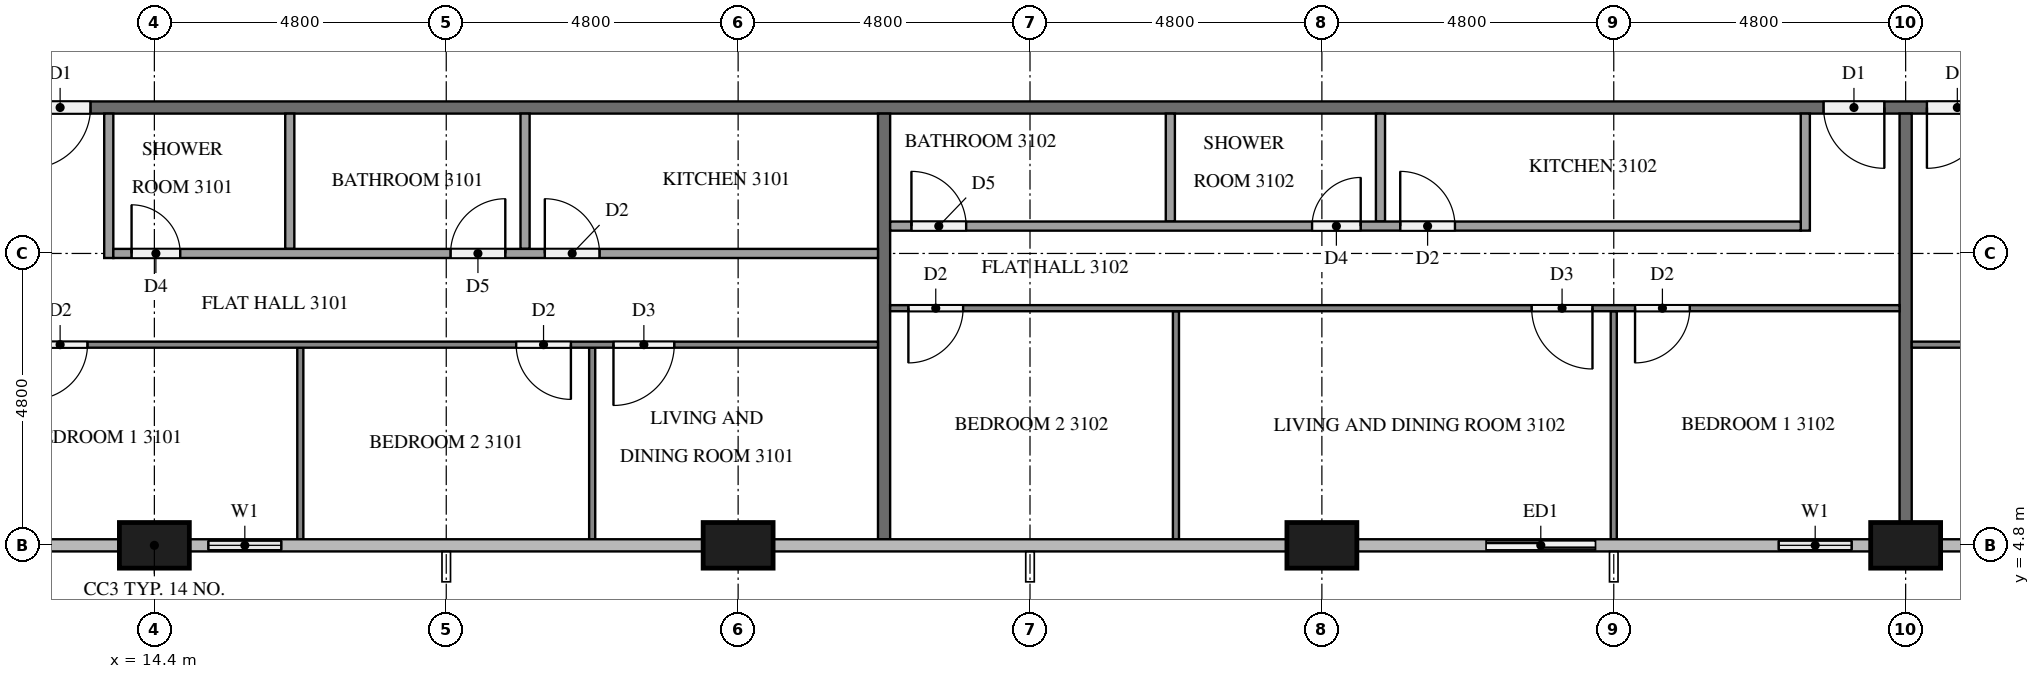
"""IFC4 building model, lengths in metres.
Left out: names, types, materials, properties, quantities, classifications, styles, units other than length and angle.
Written with IfcOpenShell. Run it as: python <this file> out.ifc"""

import sys

from ifc_helpers import new_model, si_unit, direction, frame, frame_2d, origin, origin_2d, place, context, subcontext, project, spatial, rectangle, extrude, element, fill, save


model = new_model("IFC4")
c1 = context("Model", 3, precision=1e-05, world=origin(), true_north=direction((0.0, 1.0)))
c2 = subcontext(c1, "Body", "Model", "MODEL_VIEW")
j1 = project(units=[si_unit("LENGTHUNIT", "METRE"), si_unit("PLANEANGLEUNIT", "RADIAN")], contexts=[c1])
p1 = place(None, origin())
s1 = spatial("IfcSite", under=j1, at=p1, CompositionType="ELEMENT")
p2 = place(p1, origin())
s2 = spatial("IfcBuilding", under=s1, at=p2, CompositionType="ELEMENT")
p3 = place(p2, frame((0.0, 0.0, 122.6)))
s3 = spatial("IfcBuildingStorey", under=s2, at=p3, CompositionType="ELEMENT", Elevation=122.6)
for number, where, z_axis, x_axis in (
    (1, (14.4, 4.8, 0.0), (0.0, 0.0, 1.0), (1.0, 0.0, 0.0)),
    (2, (24.0, 4.8, 0.0), (0.0, 0.0, 1.0), (1.0, 0.0, 0.0)),
    (3, (33.6, 4.8, 0.0), (0.0, 0.0, 1.0), (1.0, 0.0, 0.0)),
    (4, (43.2, 4.8, 0.0), (0.0, 0.0, 1.0), (1.0, 0.0, 0.0)),
):
    element("IfcColumn", number, at=place(p3, frame(where, z_axis=z_axis, x_axis=x_axis)), inside=s3, PredefinedType="COLUMN", context=c2, shape_type="SweptSolid", body=[
        extrude(rectangle(XDim=1.15, YDim=0.75, at=origin_2d()), origin(), (0.0, 0.0, 1.0), 3.2),
    ])
p4 = place(p3, frame((14.975, 4.8, 0.0), z_axis=(0.0, 0.0, 1.0), x_axis=(1.0, 0.0, 0.0)))
e5 = element("IfcWall", 5, at=p4, inside=s3, PredefinedType="SOLIDWALL", context=c2, shape_type="SweptSolid", body=[
    extrude(rectangle(XDim=1.825, YDim=0.15, at=frame_2d((0.913, 0.0))), origin(), (0.0, 0.0, 1.0), 3.2),
])
p5 = place(p4, frame((0.312, 0.0, 0.9)))
e6 = element("IfcOpeningElement", 6, at=p5, cuts=e5, PredefinedType="OPENING", context=c2, shape_type="SweptSolid", body=[
    extrude(rectangle(XDim=1.2, YDim=1.4, at=frame_2d((0.6, 0.7))), frame((0.0, 0.085, 0.0), z_axis=(0.0, -1.0, 0.0), x_axis=(1.0, 0.0, 0.0)), (0.0, 0.0, 1.0), 0.17),
])
p6 = place(p3, frame((36.0, 4.8, 0.0), z_axis=(0.0, 0.0, 1.0), x_axis=(1.0, 0.0, 0.0)))
e7 = element("IfcWall", 7, at=p6, inside=s3, PredefinedType="SOLIDWALL", context=c2, shape_type="SweptSolid", body=[
    extrude(rectangle(XDim=2.4, YDim=0.15, at=frame_2d((1.2, 0.0))), origin(), (0.0, 0.0, 1.0), 3.2),
])
p7 = place(p6, frame((0.3, 0.0, 0.0)))
e8 = element("IfcOpeningElement", 8, at=p7, cuts=e7, PredefinedType="OPENING", context=c2, shape_type="SweptSolid", body=[
    extrude(rectangle(XDim=1.8, YDim=2.4, at=frame_2d((0.9, 1.2))), frame((0.0, 0.085, 0.0), z_axis=(0.0, -1.0, 0.0), x_axis=(1.0, 0.0, 0.0)), (0.0, 0.0, 1.0), 0.17),
])
p8 = place(p3, frame((40.8, 4.8, 0.0), z_axis=(0.0, 0.0, 1.0), x_axis=(1.0, 0.0, 0.0)))
e9 = element("IfcWall", 9, at=p8, inside=s3, PredefinedType="SOLIDWALL", context=c2, shape_type="SweptSolid", body=[
    extrude(rectangle(XDim=1.825, YDim=0.15, at=frame_2d((0.913, 0.0))), origin(), (0.0, 0.0, 1.0), 3.2),
])
p9 = place(p8, frame((0.312, 0.0, 0.9)))
e10 = element("IfcOpeningElement", 10, at=p9, cuts=e9, PredefinedType="OPENING", context=c2, shape_type="SweptSolid", body=[
    extrude(rectangle(XDim=1.2, YDim=1.4, at=frame_2d((0.6, 0.7))), frame((0.0, 0.085, 0.0), z_axis=(0.0, -1.0, 0.0), x_axis=(1.0, 0.0, 0.0)), (0.0, 0.0, 1.0), 0.17),
])
p10 = place(p3, frame((50.5, 12.0, 0.0), z_axis=(0.0, 0.0, 1.0), x_axis=(-1.0, 0.0, 0.0)))
e11 = element("IfcWall", 11, at=p10, inside=s3, PredefinedType="PARTITIONING", context=c2, shape_type="SweptSolid", body=[
    extrude(rectangle(XDim=38.6, YDim=0.2, at=frame_2d((19.3, 0.0))), origin(), (0.0, 0.0, 1.0), 3.2),
])
p11 = place(p10, frame((37.15, 0.0, 0.0)))
e12 = element("IfcOpeningElement", 12, at=p11, cuts=e11, PredefinedType="OPENING", context=c2, shape_type="SweptSolid", body=[
    extrude(rectangle(XDim=1.0, YDim=2.1, at=frame_2d((0.5, 1.05))), frame((0.0, 0.11, 0.0), z_axis=(0.0, -1.0, 0.0), x_axis=(1.0, 0.0, 0.0)), (0.0, 0.0, 1.0), 0.22),
])
p12 = place(p10, frame((7.65, 0.0, 0.0)))
e13 = element("IfcOpeningElement", 13, at=p12, cuts=e11, PredefinedType="OPENING", context=c2, shape_type="SweptSolid", body=[
    extrude(rectangle(XDim=1.0, YDim=2.1, at=frame_2d((0.5, 1.05))), frame((0.0, 0.11, 0.0), z_axis=(0.0, -1.0, 0.0), x_axis=(1.0, 0.0, 0.0)), (0.0, 0.0, 1.0), 0.22),
])
p13 = place(p10, frame((5.95, 0.0, 0.0)))
e14 = element("IfcOpeningElement", 14, at=p13, cuts=e11, PredefinedType="OPENING", context=c2, shape_type="SweptSolid", body=[
    extrude(rectangle(XDim=1.0, YDim=2.1, at=frame_2d((0.5, 1.05))), frame((0.0, 0.11, 0.0), z_axis=(0.0, -1.0, 0.0), x_axis=(1.0, 0.0, 0.0)), (0.0, 0.0, 1.0), 0.22),
])
p14 = place(p3, frame((26.4, 11.9, 0.0), z_axis=(0.0, 0.0, 1.0), x_axis=(0.0, -1.0, 0.0)))
e15 = element("IfcWall", 15, at=p14, inside=s3, PredefinedType="PARTITIONING", context=c2, shape_type="SweptSolid", body=[
    extrude(rectangle(XDim=7.0, YDim=0.2, at=frame_2d((3.5, 0.0))), origin(), (0.0, 0.0, 1.0), 3.2),
])
p15 = place(p3, frame((43.2, 11.9, 0.0), z_axis=(0.0, 0.0, 1.0), x_axis=(0.0, -1.0, 0.0)))
e16 = element("IfcWall", 16, at=p15, inside=s3, PredefinedType="PARTITIONING", context=c2, shape_type="SweptSolid", body=[
    extrude(rectangle(XDim=6.725, YDim=0.2, at=frame_2d((3.362, 0.0))), origin(), (0.0, 0.0, 1.0), 3.2),
])
for number, where, z_axis, x_axis in (
    (17, (16.8, 8.05, 0.0), (0.0, 0.0, 1.0), (0.0, -1.0, 0.0)),
    (18, (21.6, 8.05, 0.0), (0.0, 0.0, 1.0), (0.0, -1.0, 0.0)),
):
    element("IfcWall", number, at=place(p3, frame(where, z_axis=z_axis, x_axis=x_axis)), inside=s3, PredefinedType="PARTITIONING", context=c2, shape_type="SweptSolid", body=[
        extrude(rectangle(XDim=3.15, YDim=0.1, at=frame_2d((1.575, 0.0))), origin(), (0.0, 0.0, 1.0), 3.2),
    ])
p16 = place(p3, frame((26.3, 8.1, 0.0), z_axis=(0.0, 0.0, 1.0), x_axis=(-1.0, 0.0, 0.0)))
e19 = element("IfcWall", 19, at=p16, inside=s3, PredefinedType="PARTITIONING", context=c2, shape_type="SweptSolid", body=[
    extrude(rectangle(XDim=14.2, YDim=0.1, at=frame_2d((7.1, 0.0))), origin(), (0.0, 0.0, 1.0), 3.2),
])
p17 = place(p16, frame((13.0, 0.0, 0.0)))
e20 = element("IfcOpeningElement", 20, at=p17, cuts=e19, PredefinedType="OPENING", context=c2, shape_type="SweptSolid", body=[
    extrude(rectangle(XDim=0.9, YDim=2.1, at=frame_2d((0.45, 1.05))), frame((0.0, 0.06, 0.0), z_axis=(0.0, -1.0, 0.0), x_axis=(1.0, 0.0, 0.0)), (0.0, 0.0, 1.0), 0.12),
])
p18 = place(p16, frame((5.05, 0.0, 0.0)))
e21 = element("IfcOpeningElement", 21, at=p18, cuts=e19, PredefinedType="OPENING", context=c2, shape_type="SweptSolid", body=[
    extrude(rectangle(XDim=0.9, YDim=2.1, at=frame_2d((0.45, 1.05))), frame((0.0, 0.06, 0.0), z_axis=(0.0, -1.0, 0.0), x_axis=(1.0, 0.0, 0.0)), (0.0, 0.0, 1.0), 0.12),
])
p19 = place(p16, frame((3.35, 0.0, 0.0)))
e22 = element("IfcOpeningElement", 22, at=p19, cuts=e19, PredefinedType="OPENING", context=c2, shape_type="SweptSolid", body=[
    extrude(rectangle(XDim=1.0, YDim=2.1, at=frame_2d((0.5, 1.05))), frame((0.0, 0.06, 0.0), z_axis=(0.0, -1.0, 0.0), x_axis=(1.0, 0.0, 0.0)), (0.0, 0.0, 1.0), 0.12),
])
for number, where, z_axis, x_axis in (
    (23, (16.627, 11.9, 0.0), (0.0, 0.0, 1.0), (0.0, -1.0, 0.0)),
    (24, (20.496, 11.9, 0.0), (0.0, 0.0, 1.0), (0.0, -1.0, 0.0)),
):
    element("IfcWall", number, at=place(p3, frame(where, z_axis=z_axis, x_axis=x_axis)), inside=s3, PredefinedType="PARTITIONING", context=c2, shape_type="SweptSolid", body=[
        extrude(rectangle(XDim=2.225, YDim=0.15, at=frame_2d((1.112, 0.0))), origin(), (0.0, 0.0, 1.0), 3.2),
    ])
p20 = place(p3, frame((13.65, 11.9, 0.0), z_axis=(0.0, 0.0, 1.0), x_axis=(0.0, -1.0, 0.0)))
e25 = element("IfcWall", 25, at=p20, inside=s3, PredefinedType="PARTITIONING", context=c2, shape_type="SweptSolid", body=[
    extrude(rectangle(XDim=2.375, YDim=0.15, at=frame_2d((1.188, 0.0))), origin(), (0.0, 0.0, 1.0), 3.2),
])
p21 = place(p3, frame((13.725, 9.6, 0.0), z_axis=(0.0, 0.0, 1.0), x_axis=(1.0, 0.0, 0.0)))
e26 = element("IfcWall", 26, at=p21, inside=s3, PredefinedType="PARTITIONING", context=c2, shape_type="SweptSolid", body=[
    extrude(rectangle(XDim=12.575, YDim=0.15, at=frame_2d((6.288, 0.0))), origin(), (0.0, 0.0, 1.0), 3.2),
])
p22 = place(p21, frame((0.3, 0.0, 0.0)))
e27 = element("IfcOpeningElement", 27, at=p22, cuts=e26, PredefinedType="OPENING", context=c2, shape_type="SweptSolid", body=[
    extrude(rectangle(XDim=0.8, YDim=2.1, at=frame_2d((0.4, 1.05))), frame((0.0, 0.085, 0.0), z_axis=(0.0, -1.0, 0.0), x_axis=(1.0, 0.0, 0.0)), (0.0, 0.0, 1.0), 0.17),
])
p23 = place(p21, frame((5.546, 0.0, 0.0)))
e28 = element("IfcOpeningElement", 28, at=p23, cuts=e26, PredefinedType="OPENING", context=c2, shape_type="SweptSolid", body=[
    extrude(rectangle(XDim=0.9, YDim=2.1, at=frame_2d((0.45, 1.05))), frame((0.0, 0.085, 0.0), z_axis=(0.0, -1.0, 0.0), x_axis=(1.0, 0.0, 0.0)), (0.0, 0.0, 1.0), 0.17),
])
p24 = place(p21, frame((7.096, 0.0, 0.0)))
e29 = element("IfcOpeningElement", 29, at=p24, cuts=e26, PredefinedType="OPENING", context=c2, shape_type="SweptSolid", body=[
    extrude(rectangle(XDim=0.9, YDim=2.1, at=frame_2d((0.45, 1.05))), frame((0.0, 0.085, 0.0), z_axis=(0.0, -1.0, 0.0), x_axis=(1.0, 0.0, 0.0)), (0.0, 0.0, 1.0), 0.17),
])
for number, where, z_axis, x_axis in (
    (30, (38.4, 8.65, 0.0), (0.0, 0.0, 1.0), (0.0, -1.0, 0.0)),
    (31, (31.2, 8.65, 0.0), (0.0, 0.0, 1.0), (0.0, -1.0, 0.0)),
):
    element("IfcWall", number, at=place(p3, frame(where, z_axis=z_axis, x_axis=x_axis)), inside=s3, PredefinedType="PARTITIONING", context=c2, shape_type="SweptSolid", body=[
        extrude(rectangle(XDim=3.75, YDim=0.1, at=frame_2d((1.875, 0.0))), origin(), (0.0, 0.0, 1.0), 3.2),
    ])
p25 = place(p3, frame((43.1, 8.7, 0.0), z_axis=(0.0, 0.0, 1.0), x_axis=(-1.0, 0.0, 0.0)))
e32 = element("IfcWall", 32, at=p25, inside=s3, PredefinedType="PARTITIONING", context=c2, shape_type="SweptSolid", body=[
    extrude(rectangle(XDim=16.6, YDim=0.1, at=frame_2d((8.3, 0.0))), origin(), (0.0, 0.0, 1.0), 3.2),
])
p26 = place(p25, frame((3.45, 0.0, 0.0)))
e33 = element("IfcOpeningElement", 33, at=p26, cuts=e32, PredefinedType="OPENING", context=c2, shape_type="SweptSolid", body=[
    extrude(rectangle(XDim=0.9, YDim=2.1, at=frame_2d((0.45, 1.05))), frame((0.0, 0.06, 0.0), z_axis=(0.0, -1.0, 0.0), x_axis=(1.0, 0.0, 0.0)), (0.0, 0.0, 1.0), 0.12),
])
p27 = place(p25, frame((5.05, 0.0, 0.0)))
e34 = element("IfcOpeningElement", 34, at=p27, cuts=e32, PredefinedType="OPENING", context=c2, shape_type="SweptSolid", body=[
    extrude(rectangle(XDim=1.0, YDim=2.1, at=frame_2d((0.5, 1.05))), frame((0.0, 0.06, 0.0), z_axis=(0.0, -1.0, 0.0), x_axis=(1.0, 0.0, 0.0)), (0.0, 0.0, 1.0), 0.12),
])
p28 = place(p25, frame((15.4, 0.0, 0.0)))
e35 = element("IfcOpeningElement", 35, at=p28, cuts=e32, PredefinedType="OPENING", context=c2, shape_type="SweptSolid", body=[
    extrude(rectangle(XDim=0.9, YDim=2.1, at=frame_2d((0.45, 1.05))), frame((0.0, 0.06, 0.0), z_axis=(0.0, -1.0, 0.0), x_axis=(1.0, 0.0, 0.0)), (0.0, 0.0, 1.0), 0.12),
])
for number, where, z_axis, x_axis in (
    (36, (34.563, 11.9, 0.0), (0.0, 0.0, 1.0), (0.0, -1.0, 0.0)),
    (37, (31.108, 11.9, 0.0), (0.0, 0.0, 1.0), (0.0, -1.0, 0.0)),
):
    element("IfcWall", number, at=place(p3, frame(where, z_axis=z_axis, x_axis=x_axis)), inside=s3, PredefinedType="PARTITIONING", context=c2, shape_type="SweptSolid", body=[
        extrude(rectangle(XDim=1.775, YDim=0.15, at=frame_2d((0.887, 0.0))), origin(), (0.0, 0.0, 1.0), 3.2),
    ])
p29 = place(p3, frame((41.55, 11.9, 0.0), z_axis=(0.0, 0.0, 1.0), x_axis=(0.0, -1.0, 0.0)))
e38 = element("IfcWall", 38, at=p29, inside=s3, PredefinedType="PARTITIONING", context=c2, shape_type="SweptSolid", body=[
    extrude(rectangle(XDim=1.925, YDim=0.15, at=frame_2d((0.962, 0.0))), origin(), (0.0, 0.0, 1.0), 3.2),
])
p30 = place(p3, frame((26.5, 10.05, 0.0), z_axis=(0.0, 0.0, 1.0), x_axis=(1.0, 0.0, 0.0)))
e39 = element("IfcWall", 39, at=p30, inside=s3, PredefinedType="PARTITIONING", context=c2, shape_type="SweptSolid", body=[
    extrude(rectangle(XDim=14.975, YDim=0.15, at=frame_2d((7.488, 0.0))), origin(), (0.0, 0.0, 1.0), 3.2),
])
p31 = place(p30, frame((8.388, 0.0, 0.0)))
e40 = element("IfcOpeningElement", 40, at=p31, cuts=e39, PredefinedType="OPENING", context=c2, shape_type="SweptSolid", body=[
    extrude(rectangle(XDim=0.9, YDim=2.1, at=frame_2d((0.45, 1.05))), frame((0.0, 0.085, 0.0), z_axis=(0.0, -1.0, 0.0), x_axis=(1.0, 0.0, 0.0)), (0.0, 0.0, 1.0), 0.17),
])
p32 = place(p30, frame((6.938, 0.0, 0.0)))
e41 = element("IfcOpeningElement", 41, at=p32, cuts=e39, PredefinedType="OPENING", context=c2, shape_type="SweptSolid", body=[
    extrude(rectangle(XDim=0.8, YDim=2.1, at=frame_2d((0.4, 1.05))), frame((0.0, 0.085, 0.0), z_axis=(0.0, -1.0, 0.0), x_axis=(1.0, 0.0, 0.0)), (0.0, 0.0, 1.0), 0.17),
])
p33 = place(p30, frame((0.35, 0.0, 0.0)))
e42 = element("IfcOpeningElement", 42, at=p33, cuts=e39, PredefinedType="OPENING", context=c2, shape_type="SweptSolid", body=[
    extrude(rectangle(XDim=0.9, YDim=2.1, at=frame_2d((0.45, 1.05))), frame((0.0, 0.085, 0.0), z_axis=(0.0, -1.0, 0.0), x_axis=(1.0, 0.0, 0.0)), (0.0, 0.0, 1.0), 0.17),
])
p34 = place(p3, frame((50.3, 8.1, 0.0), z_axis=(0.0, 0.0, 1.0), x_axis=(-1.0, 0.0, 0.0)))
e43 = element("IfcWall", 43, at=p34, inside=s3, PredefinedType="PARTITIONING", context=c2, shape_type="SweptSolid", body=[
    extrude(rectangle(XDim=7.0, YDim=0.1, at=frame_2d((3.5, 0.0))), origin(), (0.0, 0.0, 1.0), 3.2),
])
p35 = place(p34, frame((0.3, 0.0, 0.0)))
e44 = element("IfcOpeningElement", 44, at=p35, cuts=e43, PredefinedType="OPENING", context=c2, shape_type="SweptSolid", body=[
    extrude(rectangle(XDim=1.0, YDim=2.1, at=frame_2d((0.5, 1.05))), frame((0.0, 0.06, 0.0), z_axis=(0.0, -1.0, 0.0), x_axis=(1.0, 0.0, 0.0)), (0.0, 0.0, 1.0), 0.12),
])
p36 = place(p5, origin())
e45 = element("IfcWindow", 45, at=p36, inside=s3, PartitioningType="SINGLE_PANEL", PredefinedType="WINDOW", context=c2, shape_type="SweptSolid", body=[
    extrude(rectangle(XDim=1.2, YDim=1.4, at=frame_2d((0.6, 0.7))), frame((0.0, 0.03, 0.0), z_axis=(0.0, -1.0, 0.0), x_axis=(1.0, 0.0, 0.0)), (0.0, 0.0, 1.0), 0.06),
])
fill(e6, e45)
p37 = place(p7, origin())
e46 = element("IfcDoor", 46, at=p37, inside=s3, OperationType="SLIDING_TO_LEFT", PredefinedType="DOOR", context=c2, shape_type="SweptSolid", body=[
    extrude(rectangle(XDim=1.8, YDim=2.4, at=frame_2d((0.9, 1.2))), frame((0.0, 0.025, 0.0), z_axis=(0.0, -1.0, 0.0), x_axis=(1.0, 0.0, 0.0)), (0.0, 0.0, 1.0), 0.05),
])
fill(e8, e46)
p38 = place(p9, origin())
e47 = element("IfcWindow", 47, at=p38, inside=s3, PartitioningType="SINGLE_PANEL", PredefinedType="WINDOW", context=c2, shape_type="SweptSolid", body=[
    extrude(rectangle(XDim=1.2, YDim=1.4, at=frame_2d((0.6, 0.7))), frame((0.0, 0.03, 0.0), z_axis=(0.0, -1.0, 0.0), x_axis=(1.0, 0.0, 0.0)), (0.0, 0.0, 1.0), 0.06),
])
fill(e10, e47)
p39 = place(p11, origin())
e48 = element("IfcDoor", 48, at=p39, inside=s3, OperationType="SINGLE_SWING_RIGHT", PredefinedType="DOOR", context=c2, shape_type="SweptSolid", body=[
    extrude(rectangle(XDim=1.0, YDim=2.1, at=frame_2d((0.5, 1.05))), frame((0.0, 0.025, 0.0), z_axis=(0.0, -1.0, 0.0), x_axis=(1.0, 0.0, 0.0)), (0.0, 0.0, 1.0), 0.05),
])
fill(e12, e48)
p40 = place(p12, origin())
e49 = element("IfcDoor", 49, at=p40, inside=s3, OperationType="SINGLE_SWING_LEFT", PredefinedType="DOOR", context=c2, shape_type="SweptSolid", body=[
    extrude(rectangle(XDim=1.0, YDim=2.1, at=frame_2d((0.5, 1.05))), frame((0.0, 0.025, 0.0), z_axis=(0.0, -1.0, 0.0), x_axis=(1.0, 0.0, 0.0)), (0.0, 0.0, 1.0), 0.05),
])
fill(e13, e49)
p41 = place(p13, origin())
e50 = element("IfcDoor", 50, at=p41, inside=s3, OperationType="SINGLE_SWING_RIGHT", PredefinedType="DOOR", context=c2, shape_type="SweptSolid", body=[
    extrude(rectangle(XDim=1.0, YDim=2.1, at=frame_2d((0.5, 1.05))), frame((0.0, 0.025, 0.0), z_axis=(0.0, -1.0, 0.0), x_axis=(1.0, 0.0, 0.0)), (0.0, 0.0, 1.0), 0.05),
])
fill(e14, e50)
p42 = place(p17, origin())
e51 = element("IfcDoor", 51, at=p42, inside=s3, OperationType="SINGLE_SWING_RIGHT", PredefinedType="DOOR", context=c2, shape_type="SweptSolid", body=[
    extrude(rectangle(XDim=0.9, YDim=2.1, at=frame_2d((0.45, 1.05))), frame((0.0, 0.025, 0.0), z_axis=(0.0, -1.0, 0.0), x_axis=(1.0, 0.0, 0.0)), (0.0, 0.0, 1.0), 0.05),
])
fill(e20, e51)
p43 = place(p18, origin())
e52 = element("IfcDoor", 52, at=p43, inside=s3, OperationType="SINGLE_SWING_LEFT", PredefinedType="DOOR", context=c2, shape_type="SweptSolid", body=[
    extrude(rectangle(XDim=0.9, YDim=2.1, at=frame_2d((0.45, 1.05))), frame((0.0, 0.025, 0.0), z_axis=(0.0, -1.0, 0.0), x_axis=(1.0, 0.0, 0.0)), (0.0, 0.0, 1.0), 0.05),
])
fill(e21, e52)
p44 = place(p19, origin())
e53 = element("IfcDoor", 53, at=p44, inside=s3, OperationType="SINGLE_SWING_RIGHT", PredefinedType="DOOR", context=c2, shape_type="SweptSolid", body=[
    extrude(rectangle(XDim=1.0, YDim=2.1, at=frame_2d((0.5, 1.05))), frame((0.0, 0.025, 0.0), z_axis=(0.0, -1.0, 0.0), x_axis=(1.0, 0.0, 0.0)), (0.0, 0.0, 1.0), 0.05),
])
fill(e22, e53)
p45 = place(p22, origin())
e54 = element("IfcDoor", 54, at=p45, inside=s3, OperationType="SINGLE_SWING_LEFT", PredefinedType="DOOR", context=c2, shape_type="SweptSolid", body=[
    extrude(rectangle(XDim=0.8, YDim=2.1, at=frame_2d((0.4, 1.05))), frame((0.0, 0.025, 0.0), z_axis=(0.0, -1.0, 0.0), x_axis=(1.0, 0.0, 0.0)), (0.0, 0.0, 1.0), 0.05),
])
fill(e27, e54)
p46 = place(p23, origin())
e55 = element("IfcDoor", 55, at=p46, inside=s3, OperationType="SINGLE_SWING_RIGHT", PredefinedType="DOOR", context=c2, shape_type="SweptSolid", body=[
    extrude(rectangle(XDim=0.9, YDim=2.1, at=frame_2d((0.45, 1.05))), frame((0.0, 0.025, 0.0), z_axis=(0.0, -1.0, 0.0), x_axis=(1.0, 0.0, 0.0)), (0.0, 0.0, 1.0), 0.05),
])
fill(e28, e55)
p47 = place(p24, origin())
e56 = element("IfcDoor", 56, at=p47, inside=s3, OperationType="SINGLE_SWING_LEFT", PredefinedType="DOOR", context=c2, shape_type="SweptSolid", body=[
    extrude(rectangle(XDim=0.9, YDim=2.1, at=frame_2d((0.45, 1.05))), frame((0.0, 0.025, 0.0), z_axis=(0.0, -1.0, 0.0), x_axis=(1.0, 0.0, 0.0)), (0.0, 0.0, 1.0), 0.05),
])
fill(e29, e56)
p48 = place(p26, origin())
e57 = element("IfcDoor", 57, at=p48, inside=s3, OperationType="SINGLE_SWING_RIGHT", PredefinedType="DOOR", context=c2, shape_type="SweptSolid", body=[
    extrude(rectangle(XDim=0.9, YDim=2.1, at=frame_2d((0.45, 1.05))), frame((0.0, 0.025, 0.0), z_axis=(0.0, -1.0, 0.0), x_axis=(1.0, 0.0, 0.0)), (0.0, 0.0, 1.0), 0.05),
])
fill(e33, e57)
p49 = place(p27, origin())
e58 = element("IfcDoor", 58, at=p49, inside=s3, OperationType="SINGLE_SWING_LEFT", PredefinedType="DOOR", context=c2, shape_type="SweptSolid", body=[
    extrude(rectangle(XDim=1.0, YDim=2.1, at=frame_2d((0.5, 1.05))), frame((0.0, 0.025, 0.0), z_axis=(0.0, -1.0, 0.0), x_axis=(1.0, 0.0, 0.0)), (0.0, 0.0, 1.0), 0.05),
])
fill(e34, e58)
p50 = place(p28, origin())
e59 = element("IfcDoor", 59, at=p50, inside=s3, OperationType="SINGLE_SWING_RIGHT", PredefinedType="DOOR", context=c2, shape_type="SweptSolid", body=[
    extrude(rectangle(XDim=0.9, YDim=2.1, at=frame_2d((0.45, 1.05))), frame((0.0, 0.025, 0.0), z_axis=(0.0, -1.0, 0.0), x_axis=(1.0, 0.0, 0.0)), (0.0, 0.0, 1.0), 0.05),
])
fill(e35, e59)
p51 = place(p31, origin())
e60 = element("IfcDoor", 60, at=p51, inside=s3, OperationType="SINGLE_SWING_LEFT", PredefinedType="DOOR", context=c2, shape_type="SweptSolid", body=[
    extrude(rectangle(XDim=0.9, YDim=2.1, at=frame_2d((0.45, 1.05))), frame((0.0, 0.025, 0.0), z_axis=(0.0, -1.0, 0.0), x_axis=(1.0, 0.0, 0.0)), (0.0, 0.0, 1.0), 0.05),
])
fill(e40, e60)
p52 = place(p32, origin())
e61 = element("IfcDoor", 61, at=p52, inside=s3, OperationType="SINGLE_SWING_RIGHT", PredefinedType="DOOR", context=c2, shape_type="SweptSolid", body=[
    extrude(rectangle(XDim=0.8, YDim=2.1, at=frame_2d((0.4, 1.05))), frame((0.0, 0.025, 0.0), z_axis=(0.0, -1.0, 0.0), x_axis=(1.0, 0.0, 0.0)), (0.0, 0.0, 1.0), 0.05),
])
fill(e41, e61)
p53 = place(p33, origin())
e62 = element("IfcDoor", 62, at=p53, inside=s3, OperationType="SINGLE_SWING_LEFT", PredefinedType="DOOR", context=c2, shape_type="SweptSolid", body=[
    extrude(rectangle(XDim=0.9, YDim=2.1, at=frame_2d((0.45, 1.05))), frame((0.0, 0.025, 0.0), z_axis=(0.0, -1.0, 0.0), x_axis=(1.0, 0.0, 0.0)), (0.0, 0.0, 1.0), 0.05),
])
fill(e42, e62)
save(model, sys.argv[1])
